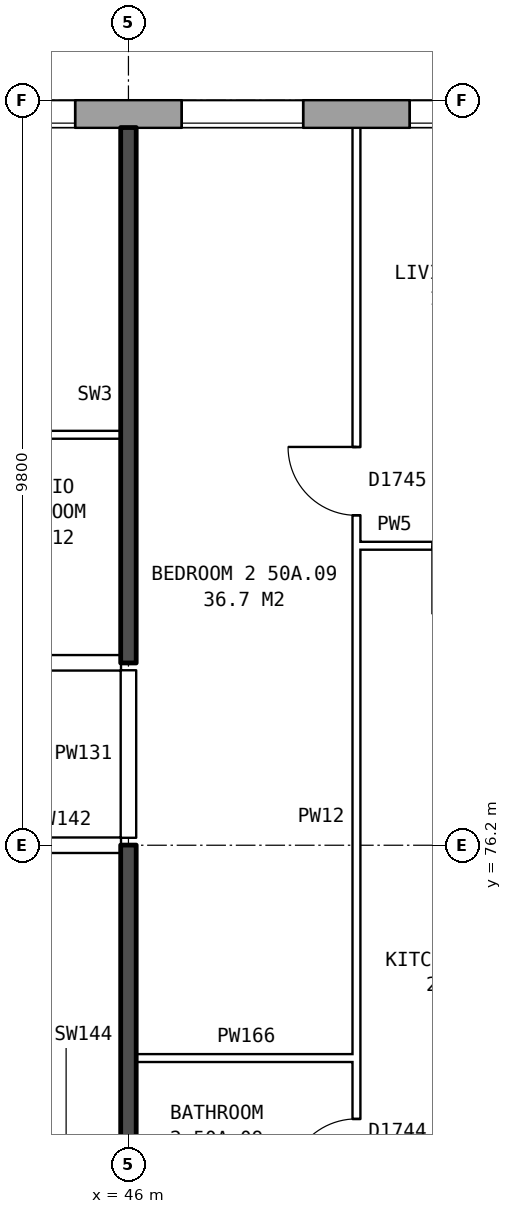
"""IFC4 building model, lengths in metres.
Left out: names, types, materials, properties, quantities, classifications, styles, units other than length and angle.
Written with IfcOpenShell. Run it as: python <this file> out.ifc"""

import sys

from ifc_helpers import new_model, si_unit, direction, frame, frame_2d, origin, place, context, subcontext, project, spatial, rectangle, extrude, element, fill, save


model = new_model("IFC4")
c1 = context("Model", 3, precision=1e-05, world=origin(), true_north=direction((0.0, 1.0)))
c2 = subcontext(c1, "Body", "Model", "MODEL_VIEW")
j1 = project(units=[si_unit("LENGTHUNIT", "METRE"), si_unit("PLANEANGLEUNIT", "RADIAN")], contexts=[c1])
p1 = place(None, origin())
s1 = spatial("IfcSite", under=j1, at=p1, CompositionType="ELEMENT")
p2 = place(p1, origin())
s2 = spatial("IfcBuilding", under=s1, at=p2, CompositionType="ELEMENT")
p3 = place(p2, frame((0.0, 0.0, 178.9)))
s3 = spatial("IfcBuildingStorey", under=s2, at=p3, CompositionType="ELEMENT", Elevation=178.9)
p4 = place(p3, frame((72.925, 85.82, 0.0), z_axis=(0.0, 0.0, 1.0), x_axis=(-1.0, 0.0, 0.0)))
e1 = element("IfcWall", 1, at=p4, inside=s3, PredefinedType="STANDARD", context=c2, shape_type="SweptSolid", body=[
    extrude(rectangle(XDim=39.601, YDim=0.36, at=frame_2d((19.8, 0.0))), origin(), (0.0, 0.0, 1.0), 2.85),
])
p5 = place(p4, frame((0.625, 0.0, 0.8)))
e2 = element("IfcOpeningElement", 2, at=p5, cuts=e1, PredefinedType="OPENING", context=c2, shape_type="SweptSolid", body=[
    extrude(rectangle(XDim=1.6, YDim=1.8, at=frame_2d((0.8, 0.9))), frame((0.0, 0.19, 0.0), z_axis=(0.0, -1.0, 0.0), x_axis=(1.0, 0.0, 0.0)), (0.0, 0.0, 1.0), 0.38),
])
p6 = place(p4, frame((3.125, 0.0, 0.8)))
e3 = element("IfcOpeningElement", 3, at=p6, cuts=e1, PredefinedType="OPENING", context=c2, shape_type="SweptSolid", body=[
    extrude(rectangle(XDim=1.6, YDim=1.8, at=frame_2d((0.8, 0.9))), frame((0.0, 0.19, 0.0), z_axis=(0.0, -1.0, 0.0), x_axis=(1.0, 0.0, 0.0)), (0.0, 0.0, 1.0), 0.38),
])
p7 = place(p4, frame((5.025, 0.0, 1.7)))
e4 = element("IfcOpeningElement", 4, at=p7, cuts=e1, PredefinedType="OPENING", context=c2, shape_type="SweptSolid", body=[
    extrude(rectangle(XDim=0.6, YDim=0.9, at=frame_2d((0.3, 0.45))), frame((0.0, 0.19, 0.0), z_axis=(0.0, -1.0, 0.0), x_axis=(1.0, 0.0, 0.0)), (0.0, 0.0, 1.0), 0.38),
])
p8 = place(p4, frame((9.625, 0.0, 0.8)))
e5 = element("IfcOpeningElement", 5, at=p8, cuts=e1, PredefinedType="OPENING", context=c2, shape_type="SweptSolid", body=[
    extrude(rectangle(XDim=1.6, YDim=1.8, at=frame_2d((0.8, 0.9))), frame((0.0, 0.19, 0.0), z_axis=(0.0, -1.0, 0.0), x_axis=(1.0, 0.0, 0.0)), (0.0, 0.0, 1.0), 0.38),
])
p9 = place(p4, frame((12.625, 0.0, 0.8)))
e6 = element("IfcOpeningElement", 6, at=p9, cuts=e1, PredefinedType="OPENING", context=c2, shape_type="SweptSolid", body=[
    extrude(rectangle(XDim=1.6, YDim=1.8, at=frame_2d((0.8, 0.9))), frame((0.0, 0.19, 0.0), z_axis=(0.0, -1.0, 0.0), x_axis=(1.0, 0.0, 0.0)), (0.0, 0.0, 1.0), 0.38),
])
p10 = place(p4, frame((15.625, 0.0, 0.8)))
e7 = element("IfcOpeningElement", 7, at=p10, cuts=e1, PredefinedType="OPENING", context=c2, shape_type="SweptSolid", body=[
    extrude(rectangle(XDim=1.6, YDim=1.8, at=frame_2d((0.8, 0.9))), frame((0.0, 0.19, 0.0), z_axis=(0.0, -1.0, 0.0), x_axis=(1.0, 0.0, 0.0)), (0.0, 0.0, 1.0), 0.38),
])
p11 = place(p4, frame((18.625, 0.0, 0.8)))
e8 = element("IfcOpeningElement", 8, at=p11, cuts=e1, PredefinedType="OPENING", context=c2, shape_type="SweptSolid", body=[
    extrude(rectangle(XDim=1.6, YDim=1.8, at=frame_2d((0.8, 0.9))), frame((0.0, 0.19, 0.0), z_axis=(0.0, -1.0, 0.0), x_axis=(1.0, 0.0, 0.0)), (0.0, 0.0, 1.0), 0.38),
])
p12 = place(p4, frame((21.625, 0.0, 0.8)))
e9 = element("IfcOpeningElement", 9, at=p12, cuts=e1, PredefinedType="OPENING", context=c2, shape_type="SweptSolid", body=[
    extrude(rectangle(XDim=1.6, YDim=1.8, at=frame_2d((0.8, 0.9))), frame((0.0, 0.19, 0.0), z_axis=(0.0, -1.0, 0.0), x_axis=(1.0, 0.0, 0.0)), (0.0, 0.0, 1.0), 0.38),
])
p13 = place(p4, frame((24.625, 0.0, 0.8)))
e10 = element("IfcOpeningElement", 10, at=p13, cuts=e1, PredefinedType="OPENING", context=c2, shape_type="SweptSolid", body=[
    extrude(rectangle(XDim=1.6, YDim=1.8, at=frame_2d((0.8, 0.9))), frame((0.0, 0.19, 0.0), z_axis=(0.0, -1.0, 0.0), x_axis=(1.0, 0.0, 0.0)), (0.0, 0.0, 1.0), 0.38),
])
p14 = place(p4, frame((27.625, 0.0, 0.8)))
e11 = element("IfcOpeningElement", 11, at=p14, cuts=e1, PredefinedType="OPENING", context=c2, shape_type="SweptSolid", body=[
    extrude(rectangle(XDim=1.6, YDim=1.8, at=frame_2d((0.8, 0.9))), frame((0.0, 0.19, 0.0), z_axis=(0.0, -1.0, 0.0), x_axis=(1.0, 0.0, 0.0)), (0.0, 0.0, 1.0), 0.38),
])
p15 = place(p4, frame((30.625, 0.0, 0.8)))
e12 = element("IfcOpeningElement", 12, at=p15, cuts=e1, PredefinedType="OPENING", context=c2, shape_type="SweptSolid", body=[
    extrude(rectangle(XDim=1.6, YDim=1.8, at=frame_2d((0.8, 0.9))), frame((0.0, 0.19, 0.0), z_axis=(0.0, -1.0, 0.0), x_axis=(1.0, 0.0, 0.0)), (0.0, 0.0, 1.0), 0.38),
])
p16 = place(p4, frame((33.925, 0.0, 1.7)))
e13 = element("IfcOpeningElement", 13, at=p16, cuts=e1, PredefinedType="OPENING", context=c2, shape_type="SweptSolid", body=[
    extrude(rectangle(XDim=0.6, YDim=0.9, at=frame_2d((0.3, 0.45))), frame((0.0, 0.19, 0.0), z_axis=(0.0, -1.0, 0.0), x_axis=(1.0, 0.0, 0.0)), (0.0, 0.0, 1.0), 0.38),
])
p17 = place(p4, frame((36.625, 0.0, 0.8)))
e14 = element("IfcOpeningElement", 14, at=p17, cuts=e1, PredefinedType="OPENING", context=c2, shape_type="SweptSolid", body=[
    extrude(rectangle(XDim=1.6, YDim=1.8, at=frame_2d((0.8, 0.9))), frame((0.0, 0.19, 0.0), z_axis=(0.0, -1.0, 0.0), x_axis=(1.0, 0.0, 0.0)), (0.0, 0.0, 1.0), 0.38),
])
p18 = place(p4, frame((6.825, 0.0, 0.8)))
e15 = element("IfcOpeningElement", 15, at=p18, cuts=e1, PredefinedType="OPENING", context=c2, shape_type="SweptSolid", body=[
    extrude(rectangle(XDim=0.6, YDim=0.9, at=frame_2d((0.3, 0.45))), frame((0.0, 0.19, 0.0), z_axis=(0.0, -1.0, 0.0), x_axis=(1.0, 0.0, 0.0)), (0.0, 0.0, 1.0), 0.38),
])
p19 = place(p4, frame((7.725, 0.0, 0.8)))
e16 = element("IfcOpeningElement", 16, at=p19, cuts=e1, PredefinedType="OPENING", context=c2, shape_type="SweptSolid", body=[
    extrude(rectangle(XDim=1.0, YDim=1.8, at=frame_2d((0.5, 0.9))), frame((0.0, 0.19, 0.0), z_axis=(0.0, -1.0, 0.0), x_axis=(1.0, 0.0, 0.0)), (0.0, 0.0, 1.0), 0.38),
])
p20 = place(p4, frame((34.825, 0.0, 0.8)))
e17 = element("IfcOpeningElement", 17, at=p20, cuts=e1, PredefinedType="OPENING", context=c2, shape_type="SweptSolid", body=[
    extrude(rectangle(XDim=1.4, YDim=1.8, at=frame_2d((0.7, 0.9))), frame((0.0, 0.19, 0.0), z_axis=(0.0, -1.0, 0.0), x_axis=(1.0, 0.0, 0.0)), (0.0, 0.0, 1.0), 0.38),
])
p21 = place(p3, frame((46.1, 73.4, 0.0), z_axis=(0.0, 0.0, 1.0), x_axis=(1.0, 0.0, 0.0)))
e18 = element("IfcWall", 18, at=p21, inside=s3, PredefinedType="PARTITIONING", context=c2, shape_type="SweptSolid", body=[
    extrude(rectangle(XDim=2.9, YDim=0.1, at=frame_2d((1.45, 0.0))), origin(), (0.0, 0.0, 1.0), 2.85),
])
p22 = place(p3, frame((44.36, 76.2, 0.0), z_axis=(0.0, 0.0, 1.0), x_axis=(1.0, 0.0, 0.0)))
e19 = element("IfcWall", 19, at=p22, inside=s3, PredefinedType="PARTITIONING", context=c2, shape_type="SweptSolid", body=[
    extrude(rectangle(XDim=1.54, YDim=0.2, at=frame_2d((0.77, 0.0))), origin(), (0.0, 0.0, 1.0), 2.85),
])
p23 = place(p3, frame((30.61, 78.6, 0.0), z_axis=(0.0, 0.0, 1.0), x_axis=(1.0, 0.0, 0.0)))
e20 = element("IfcWall", 20, at=p23, inside=s3, PredefinedType="PARTITIONING", context=c2, shape_type="SweptSolid", body=[
    extrude(rectangle(XDim=15.29, YDim=0.2, at=frame_2d((7.645, 0.0))), origin(), (0.0, 0.0, 1.0), 2.85),
])
p24 = place(p23, frame((10.69, 0.0, 0.0)))
e21 = element("IfcOpeningElement", 21, at=p24, cuts=e20, PredefinedType="OPENING", context=c2, shape_type="SweptSolid", body=[
    extrude(rectangle(XDim=1.0, YDim=2.1, at=frame_2d((0.5, 1.05))), frame((0.0, 0.11, 0.0), z_axis=(0.0, -1.0, 0.0), x_axis=(1.0, 0.0, 0.0)), (0.0, 0.0, 1.0), 0.22),
])
p25 = place(p23, frame((5.89, 0.0, 0.0)))
e22 = element("IfcOpeningElement", 22, at=p25, cuts=e20, PredefinedType="OPENING", context=c2, shape_type="SweptSolid", body=[
    extrude(rectangle(XDim=1.0, YDim=2.1, at=frame_2d((0.5, 1.05))), frame((0.0, 0.11, 0.0), z_axis=(0.0, -1.0, 0.0), x_axis=(1.0, 0.0, 0.0)), (0.0, 0.0, 1.0), 0.22),
])
p26 = place(p3, frame((49.0, 80.14, 0.0), z_axis=(0.0, 0.0, 1.0), x_axis=(1.0, 0.0, 0.0)))
e23 = element("IfcWall", 23, at=p26, inside=s3, PredefinedType="PARTITIONING", context=c2, shape_type="SweptSolid", body=[
    extrude(rectangle(XDim=2.9, YDim=0.1, at=frame_2d((1.45, 0.0))), origin(), (0.0, 0.0, 1.0), 2.85),
])
p27 = place(p26, frame((1.0, 0.0, 0.0)))
e24 = element("IfcOpeningElement", 24, at=p27, cuts=e23, PredefinedType="OPENING", context=c2, shape_type="SweptSolid", body=[
    extrude(rectangle(XDim=0.9, YDim=2.1, at=frame_2d((0.45, 1.05))), frame((0.0, 0.06, 0.0), z_axis=(0.0, -1.0, 0.0), x_axis=(1.0, 0.0, 0.0)), (0.0, 0.0, 1.0), 0.12),
])
p28 = place(p3, frame((43.6, 81.6, 0.0), z_axis=(0.0, 0.0, 1.0), x_axis=(1.0, 0.0, 0.0)))
e25 = element("IfcWall", 25, at=p28, inside=s3, PredefinedType="PARTITIONING", context=c2, shape_type="SweptSolid", body=[
    extrude(rectangle(XDim=2.3, YDim=0.1, at=frame_2d((1.15, 0.0))), origin(), (0.0, 0.0, 1.0), 2.85),
])
p29 = place(p3, frame((46.0, 71.2, 0.0), z_axis=(0.0, 0.0, 1.0), x_axis=(0.0, 1.0, 0.0)))
e26 = element("IfcWall", 26, at=p29, inside=s3, PredefinedType="SOLIDWALL", context=c2, shape_type="SweptSolid", body=[
    extrude(rectangle(XDim=5.0, YDim=0.2, at=frame_2d((2.5, 0.0))), origin(), (0.0, 0.0, 1.0), 2.85),
])
p30 = place(p3, frame((46.0, 76.3, 0.0), z_axis=(0.0, 0.0, 1.0), x_axis=(0.0, 1.0, 0.0)))
e27 = element("IfcWall", 27, at=p30, inside=s3, PredefinedType="PARTITIONING", context=c2, shape_type="SweptSolid", body=[
    extrude(rectangle(XDim=2.2, YDim=0.2, at=frame_2d((1.1, 0.0))), origin(), (0.0, 0.0, 1.0), 2.85),
])
p31 = place(p3, frame((46.0, 78.6, 0.0), z_axis=(0.0, 0.0, 1.0), x_axis=(0.0, 1.0, 0.0)))
e28 = element("IfcWall", 28, at=p31, inside=s3, PredefinedType="SOLIDWALL", context=c2, shape_type="SweptSolid", body=[
    extrude(rectangle(XDim=7.04, YDim=0.2, at=frame_2d((3.52, 0.0))), origin(), (0.0, 0.0, 1.0), 2.85),
])
p32 = place(p3, frame((49.0, 71.3, 0.0), z_axis=(0.0, 0.0, 1.0), x_axis=(0.0, 1.0, 0.0)))
e29 = element("IfcWall", 29, at=p32, inside=s3, PredefinedType="PARTITIONING", context=c2, shape_type="SweptSolid", body=[
    extrude(rectangle(XDim=14.34, YDim=0.1, at=frame_2d((7.17, 0.0))), origin(), (0.0, 0.0, 1.0), 2.85),
])
p33 = place(p32, frame((9.24, 0.0, 0.0)))
e30 = element("IfcOpeningElement", 30, at=p33, cuts=e29, PredefinedType="OPENING", context=c2, shape_type="SweptSolid", body=[
    extrude(rectangle(XDim=0.9, YDim=2.1, at=frame_2d((0.45, 1.05))), frame((0.0, 0.06, 0.0), z_axis=(0.0, -1.0, 0.0), x_axis=(1.0, 0.0, 0.0)), (0.0, 0.0, 1.0), 0.12),
])
p34 = place(p32, frame((0.4, 0.0, 0.0)))
e31 = element("IfcOpeningElement", 31, at=p34, cuts=e29, PredefinedType="OPENING", context=c2, shape_type="SweptSolid", body=[
    extrude(rectangle(XDim=0.9, YDim=2.1, at=frame_2d((0.45, 1.05))), frame((0.0, 0.06, 0.0), z_axis=(0.0, -1.0, 0.0), x_axis=(1.0, 0.0, 0.0)), (0.0, 0.0, 1.0), 0.12),
])
p35 = place(p12, origin())
e32 = element("IfcWindow", 32, at=p35, inside=s3, PartitioningType="SINGLE_PANEL", PredefinedType="WINDOW", context=c2, shape_type="SweptSolid", body=[
    extrude(rectangle(XDim=1.6, YDim=1.8, at=frame_2d((0.8, 0.9))), frame((0.0, 0.15, 0.0), z_axis=(0.0, -1.0, 0.0), x_axis=(1.0, 0.0, 0.0)), (0.0, 0.0, 1.0), 0.06),
])
fill(e9, e32)
p36 = place(p13, origin())
e33 = element("IfcWindow", 33, at=p36, inside=s3, PartitioningType="SINGLE_PANEL", PredefinedType="WINDOW", context=c2, shape_type="SweptSolid", body=[
    extrude(rectangle(XDim=1.6, YDim=1.8, at=frame_2d((0.8, 0.9))), frame((0.0, 0.15, 0.0), z_axis=(0.0, -1.0, 0.0), x_axis=(1.0, 0.0, 0.0)), (0.0, 0.0, 1.0), 0.06),
])
fill(e10, e33)
p37 = place(p14, origin())
e34 = element("IfcWindow", 34, at=p37, inside=s3, PartitioningType="SINGLE_PANEL", PredefinedType="WINDOW", context=c2, shape_type="SweptSolid", body=[
    extrude(rectangle(XDim=1.6, YDim=1.8, at=frame_2d((0.8, 0.9))), frame((0.0, 0.15, 0.0), z_axis=(0.0, -1.0, 0.0), x_axis=(1.0, 0.0, 0.0)), (0.0, 0.0, 1.0), 0.06),
])
fill(e11, e34)
p38 = place(p33, origin())
e35 = element("IfcDoor", 35, at=p38, inside=s3, OperationType="SINGLE_SWING_RIGHT", PredefinedType="DOOR", context=c2, shape_type="SweptSolid", body=[
    extrude(rectangle(XDim=0.9, YDim=2.1, at=frame_2d((0.45, 1.05))), frame((0.0, 0.025, 0.0), z_axis=(0.0, -1.0, 0.0), x_axis=(1.0, 0.0, 0.0)), (0.0, 0.0, 1.0), 0.05),
])
fill(e30, e35)
p39 = place(p34, origin())
e36 = element("IfcDoor", 36, at=p39, inside=s3, OperationType="SINGLE_SWING_LEFT", PredefinedType="DOOR", context=c2, shape_type="SweptSolid", body=[
    extrude(rectangle(XDim=0.9, YDim=2.1, at=frame_2d((0.45, 1.05))), frame((0.0, 0.025, 0.0), z_axis=(0.0, -1.0, 0.0), x_axis=(1.0, 0.0, 0.0)), (0.0, 0.0, 1.0), 0.05),
])
fill(e31, e36)
save(model, sys.argv[1])
